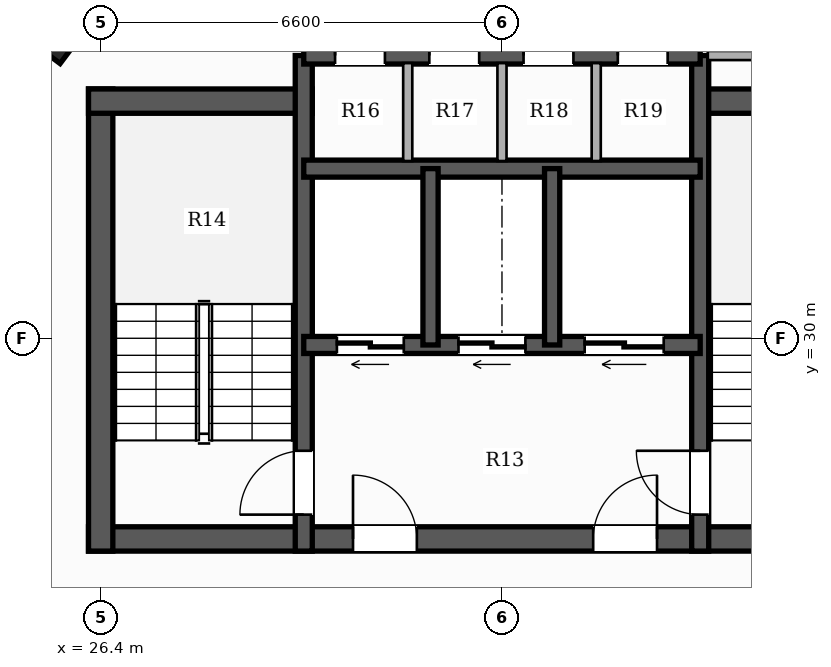
"""IFC4 building model, lengths in metres.
Left out: names, types, materials, properties, quantities, classifications, styles, units other than length and angle.
Written with IfcOpenShell. Run it as: python <this file> out.ifc"""

import sys

from ifc_helpers import new_model, si_unit, direction, frame, frame_2d, origin, origin_2d, place, context, subcontext, project, spatial, rectangle, hollow_rectangle, extrude, element, fill, save


model = new_model("IFC4")
c1 = context("Model", 3, precision=1e-05, world=origin(), true_north=direction((0.0, 1.0)))
c2 = subcontext(c1, "Body", "Model", "MODEL_VIEW")
j1 = project(units=[si_unit("LENGTHUNIT", "METRE"), si_unit("PLANEANGLEUNIT", "RADIAN")], contexts=[c1])
p1 = place(None, origin())
s1 = spatial("IfcSite", under=j1, at=p1, CompositionType="ELEMENT")
p2 = place(p1, origin())
s2 = spatial("IfcBuilding", under=s1, at=p2, CompositionType="ELEMENT")
p3 = place(p2, frame((0.0, 0.0, 129.8)))
s3 = spatial("IfcBuildingStorey", under=s2, at=p3, CompositionType="ELEMENT", Elevation=129.8)
p4 = place(p3, frame((26.2, 26.7, 0.0), z_axis=(0.0, 0.0, 1.0), x_axis=(1.0, 0.0, 0.0)))
e1 = element("IfcWall", 1, at=p4, inside=s3, PredefinedType="SHEAR", context=c2, shape_type="SweptSolid", body=[
    extrude(rectangle(XDim=13.6, YDim=0.4, at=frame_2d((6.8, 0.0))), origin(), (0.0, 0.0, 1.0), 3.3),
])
p5 = place(p4, frame((4.35, 0.0, 0.0)))
e2 = element("IfcOpeningElement", 2, at=p5, cuts=e1, PredefinedType="OPENING", context=c2, shape_type="SweptSolid", body=[
    extrude(rectangle(XDim=1.05, YDim=2.15, at=frame_2d((0.525, 1.075))), frame((0.0, 0.21, 0.0), z_axis=(0.0, -1.0, 0.0), x_axis=(1.0, 0.0, 0.0)), (0.0, 0.0, 1.0), 0.42),
])
p6 = place(p4, frame((8.3, 0.0, 0.0)))
e3 = element("IfcOpeningElement", 3, at=p6, cuts=e1, PredefinedType="OPENING", context=c2, shape_type="SweptSolid", body=[
    extrude(rectangle(XDim=1.05, YDim=2.15, at=frame_2d((0.525, 1.075))), frame((0.0, 0.21, 0.0), z_axis=(0.0, -1.0, 0.0), x_axis=(1.0, 0.0, 0.0)), (0.0, 0.0, 1.0), 0.42),
])
p7 = place(p3, frame((26.4, 26.5, 0.0), z_axis=(0.0, 0.0, 1.0), x_axis=(0.0, 1.0, 0.0)))
e4 = element("IfcWall", 4, at=p7, inside=s3, PredefinedType="SHEAR", context=c2, shape_type="SweptSolid", body=[
    extrude(rectangle(XDim=7.6, YDim=0.4, at=frame_2d((3.8, 0.0))), origin(), (0.0, 0.0, 1.0), 3.3),
])
for number, where, z_axis, x_axis in (
    (5, (26.2, 33.9, 0.0), (0.0, 0.0, 1.0), (1.0, 0.0, 0.0)),
    (6, (36.12, 33.9, 0.0), (0.0, 0.0, 1.0), (1.0, 0.0, 0.0)),
):
    element("IfcWall", number, at=place(p3, frame(where, z_axis=z_axis, x_axis=x_axis)), inside=s3, PredefinedType="SHEAR", context=c2, shape_type="SweptSolid", body=[
        extrude(rectangle(XDim=3.68, YDim=0.4, at=frame_2d((1.84, 0.0))), origin(), (0.0, 0.0, 1.0), 3.3),
    ])
p8 = place(p3, frame((29.74, 26.5, 0.0), z_axis=(0.0, 0.0, 1.0), x_axis=(0.0, 1.0, 0.0)))
e7 = element("IfcWall", 7, at=p8, inside=s3, PredefinedType="SHEAR", context=c2, shape_type="SweptSolid", body=[
    extrude(rectangle(XDim=8.15, YDim=0.28, at=frame_2d((4.075, 0.0))), origin(), (0.0, 0.0, 1.0), 3.3),
])
p9 = place(p8, frame((0.6, 0.0, 0.0)))
e8 = element("IfcOpeningElement", 8, at=p9, cuts=e7, PredefinedType="OPENING", context=c2, shape_type="SweptSolid", body=[
    extrude(rectangle(XDim=1.05, YDim=2.15, at=frame_2d((0.525, 1.075))), frame((0.0, 0.15, 0.0), z_axis=(0.0, -1.0, 0.0), x_axis=(1.0, 0.0, 0.0)), (0.0, 0.0, 1.0), 0.3),
])
p10 = place(p3, frame((36.26, 26.5, 0.0), z_axis=(0.0, 0.0, 1.0), x_axis=(0.0, 1.0, 0.0)))
e9 = element("IfcWall", 9, at=p10, inside=s3, PredefinedType="SHEAR", context=c2, shape_type="SweptSolid", body=[
    extrude(rectangle(XDim=8.15, YDim=0.28, at=frame_2d((4.075, 0.0))), origin(), (0.0, 0.0, 1.0), 3.3),
])
p11 = place(p10, frame((0.6, 0.0, 0.0)))
e10 = element("IfcOpeningElement", 10, at=p11, cuts=e9, PredefinedType="OPENING", context=c2, shape_type="SweptSolid", body=[
    extrude(rectangle(XDim=1.05, YDim=2.15, at=frame_2d((0.525, 1.075))), frame((0.0, 0.15, 0.0), z_axis=(0.0, -1.0, 0.0), x_axis=(1.0, 0.0, 0.0)), (0.0, 0.0, 1.0), 0.3),
])
p12 = place(p3, frame((36.26, 29.89, 0.0), z_axis=(0.0, 0.0, 1.0), x_axis=(-1.0, 0.0, 0.0)))
e11 = element("IfcWall", 11, at=p12, inside=s3, PredefinedType="SHEAR", context=c2, shape_type="SweptSolid", body=[
    extrude(rectangle(XDim=6.52, YDim=0.28, at=frame_2d((3.26, 0.0))), origin(), (0.0, 0.0, 1.0), 3.3),
])
p13 = place(p12, frame((4.875, 0.0, 0.0)))
e12 = element("IfcOpeningElement", 12, at=p13, cuts=e11, PredefinedType="OPENING", context=c2, shape_type="SweptSolid", body=[
    extrude(rectangle(XDim=1.1, YDim=2.2, at=frame_2d((0.55, 1.1))), frame((0.0, 0.15, 0.0), z_axis=(0.0, -1.0, 0.0), x_axis=(1.0, 0.0, 0.0)), (0.0, 0.0, 1.0), 0.3),
])
p14 = place(p12, frame((2.875, 0.0, 0.0)))
e13 = element("IfcOpeningElement", 13, at=p14, cuts=e11, PredefinedType="OPENING", context=c2, shape_type="SweptSolid", body=[
    extrude(rectangle(XDim=1.1, YDim=2.2, at=frame_2d((0.55, 1.1))), frame((0.0, 0.15, 0.0), z_axis=(0.0, -1.0, 0.0), x_axis=(1.0, 0.0, 0.0)), (0.0, 0.0, 1.0), 0.3),
])
p15 = place(p12, frame((0.6, 0.0, 0.0)))
e14 = element("IfcOpeningElement", 14, at=p15, cuts=e11, PredefinedType="OPENING", context=c2, shape_type="SweptSolid", body=[
    extrude(rectangle(XDim=1.3, YDim=2.2, at=frame_2d((0.65, 1.1))), frame((0.0, 0.15, 0.0), z_axis=(0.0, -1.0, 0.0), x_axis=(1.0, 0.0, 0.0)), (0.0, 0.0, 1.0), 0.3),
])
p16 = place(p3, frame((29.74, 32.79, 0.0), z_axis=(0.0, 0.0, 1.0), x_axis=(1.0, 0.0, 0.0)))
e15 = element("IfcWall", 15, at=p16, inside=s3, PredefinedType="SHEAR", context=c2, shape_type="SweptSolid", body=[
    extrude(rectangle(XDim=6.52, YDim=0.28, at=frame_2d((3.26, 0.0))), origin(), (0.0, 0.0, 1.0), 3.3),
])
for number, where, z_axis, x_axis in (
    (16, (31.825, 29.89, 0.0), (0.0, 0.0, 1.0), (0.0, 1.0, 0.0)),
    (17, (33.825, 29.89, 0.0), (0.0, 0.0, 1.0), (0.0, 1.0, 0.0)),
):
    element("IfcWall", number, at=place(p3, frame(where, z_axis=z_axis, x_axis=x_axis)), inside=s3, PredefinedType="SHEAR", context=c2, shape_type="SweptSolid", body=[
        extrude(rectangle(XDim=2.9, YDim=0.25, at=frame_2d((1.45, 0.0))), origin(), (0.0, 0.0, 1.0), 3.3),
    ])
p17 = place(p3, frame((29.74, 34.65, 0.0), z_axis=(0.0, 0.0, 1.0), x_axis=(1.0, 0.0, 0.0)))
e18 = element("IfcWall", 18, at=p17, inside=s3, PredefinedType="SHEAR", context=c2, shape_type="SweptSolid", body=[
    extrude(rectangle(XDim=6.52, YDim=0.28, at=frame_2d((3.26, 0.0))), origin(), (0.0, 0.0, 1.0), 3.3),
])
p18 = place(p17, frame((0.515, 0.0, 0.0)))
e19 = element("IfcOpeningElement", 19, at=p18, cuts=e18, PredefinedType="OPENING", context=c2, shape_type="SweptSolid", body=[
    extrude(rectangle(XDim=0.82, YDim=2.1, at=frame_2d((0.41, 1.05))), frame((0.0, 0.15, 0.0), z_axis=(0.0, -1.0, 0.0), x_axis=(1.0, 0.0, 0.0)), (0.0, 0.0, 1.0), 0.3),
])
p19 = place(p17, frame((2.065, 0.0, 0.0)))
e20 = element("IfcOpeningElement", 20, at=p19, cuts=e18, PredefinedType="OPENING", context=c2, shape_type="SweptSolid", body=[
    extrude(rectangle(XDim=0.82, YDim=2.1, at=frame_2d((0.41, 1.05))), frame((0.0, 0.15, 0.0), z_axis=(0.0, -1.0, 0.0), x_axis=(1.0, 0.0, 0.0)), (0.0, 0.0, 1.0), 0.3),
])
p20 = place(p17, frame((3.615, 0.0, 0.0)))
e21 = element("IfcOpeningElement", 21, at=p20, cuts=e18, PredefinedType="OPENING", context=c2, shape_type="SweptSolid", body=[
    extrude(rectangle(XDim=0.82, YDim=2.1, at=frame_2d((0.41, 1.05))), frame((0.0, 0.15, 0.0), z_axis=(0.0, -1.0, 0.0), x_axis=(1.0, 0.0, 0.0)), (0.0, 0.0, 1.0), 0.3),
])
p21 = place(p17, frame((5.165, 0.0, 0.0)))
e22 = element("IfcOpeningElement", 22, at=p21, cuts=e18, PredefinedType="OPENING", context=c2, shape_type="SweptSolid", body=[
    extrude(rectangle(XDim=0.82, YDim=2.1, at=frame_2d((0.41, 1.05))), frame((0.0, 0.15, 0.0), z_axis=(0.0, -1.0, 0.0), x_axis=(1.0, 0.0, 0.0)), (0.0, 0.0, 1.0), 0.3),
])
p22 = place(p3, frame((25.648, 35.113, 0.0), z_axis=(0.0, 0.0, 1.0), x_axis=(0.600420225326, 0.799684658487, 0.0)))
e23 = element("IfcColumn", 23, at=p22, inside=s3, PredefinedType="COLUMN", context=c2, shape_type="SweptSolid", body=[
    extrude(hollow_rectangle(XDim=0.85, YDim=0.85, WallThickness=0.028, at=origin_2d()), origin(), (0.0, 0.0, 1.0), 3.3),
])
p23 = place(p3, frame((36.385, 34.65, 0.0), z_axis=(0.0, 0.0, 1.0), x_axis=(1.0, 0.0, 0.0)))
e24 = element("IfcWall", 24, at=p23, inside=s3, PredefinedType="PARTITIONING", context=c2, shape_type="SweptSolid", body=[
    extrude(rectangle(XDim=1.405, YDim=0.15, at=frame_2d((0.703, 0.0))), origin(), (0.0, 0.0, 1.0), 2.425),
])
for number, where, z_axis, x_axis in (
    (25, (31.45, 32.915, 0.0), (0.0, 0.0, 1.0), (0.0, 1.0, 0.0)),
    (26, (33.0, 32.915, 0.0), (0.0, 0.0, 1.0), (0.0, 1.0, 0.0)),
    (27, (34.55, 32.915, 0.0), (0.0, 0.0, 1.0), (0.0, 1.0, 0.0)),
):
    element("IfcWall", number, at=place(p3, frame(where, z_axis=z_axis, x_axis=x_axis)), inside=s3, PredefinedType="PARTITIONING", context=c2, shape_type="SweptSolid", body=[
        extrude(rectangle(XDim=1.61, YDim=0.15, at=frame_2d((0.805, 0.0))), origin(), (0.0, 0.0, 1.0), 3.06),
    ])
p24 = place(p9, origin())
e28 = element("IfcDoor", 28, at=p24, inside=s3, OperationType="SINGLE_SWING_LEFT", PredefinedType="DOOR", context=c2, shape_type="SweptSolid", body=[
    extrude(rectangle(XDim=1.05, YDim=2.15, at=frame_2d((0.525, 1.075))), frame((0.0, 0.025, 0.0), z_axis=(0.0, -1.0, 0.0), x_axis=(1.0, 0.0, 0.0)), (0.0, 0.0, 1.0), 0.05),
])
fill(e8, e28)
p25 = place(p11, origin())
e29 = element("IfcDoor", 29, at=p25, inside=s3, OperationType="SINGLE_SWING_RIGHT", PredefinedType="DOOR", context=c2, shape_type="SweptSolid", body=[
    extrude(rectangle(XDim=1.05, YDim=2.15, at=frame_2d((0.525, 1.075))), frame((0.0, 0.025, 0.0), z_axis=(0.0, -1.0, 0.0), x_axis=(1.0, 0.0, 0.0)), (0.0, 0.0, 1.0), 0.05),
])
fill(e10, e29)
p26 = place(p5, origin())
e30 = element("IfcDoor", 30, at=p26, inside=s3, OperationType="SINGLE_SWING_LEFT", PredefinedType="DOOR", context=c2, shape_type="SweptSolid", body=[
    extrude(rectangle(XDim=1.05, YDim=2.15, at=frame_2d((0.525, 1.075))), frame((0.0, 0.025, 0.0), z_axis=(0.0, -1.0, 0.0), x_axis=(1.0, 0.0, 0.0)), (0.0, 0.0, 1.0), 0.05),
])
fill(e2, e30)
p27 = place(p6, origin())
e31 = element("IfcDoor", 31, at=p27, inside=s3, OperationType="SINGLE_SWING_RIGHT", PredefinedType="DOOR", context=c2, shape_type="SweptSolid", body=[
    extrude(rectangle(XDim=1.05, YDim=2.15, at=frame_2d((0.525, 1.075))), frame((0.0, 0.025, 0.0), z_axis=(0.0, -1.0, 0.0), x_axis=(1.0, 0.0, 0.0)), (0.0, 0.0, 1.0), 0.05),
])
fill(e3, e31)
p28 = place(p13, origin())
e32 = element("IfcDoor", 32, at=p28, inside=s3, OperationType="DOUBLE_DOOR_SLIDING", PredefinedType="DOOR", context=c2, shape_type="SweptSolid", body=[
    extrude(rectangle(XDim=1.1, YDim=2.2, at=frame_2d((0.55, 1.1))), frame((0.0, 0.025, 0.0), z_axis=(0.0, -1.0, 0.0), x_axis=(1.0, 0.0, 0.0)), (0.0, 0.0, 1.0), 0.05),
])
fill(e12, e32)
p29 = place(p14, origin())
e33 = element("IfcDoor", 33, at=p29, inside=s3, OperationType="DOUBLE_DOOR_SLIDING", PredefinedType="DOOR", context=c2, shape_type="SweptSolid", body=[
    extrude(rectangle(XDim=1.1, YDim=2.2, at=frame_2d((0.55, 1.1))), frame((0.0, 0.025, 0.0), z_axis=(0.0, -1.0, 0.0), x_axis=(1.0, 0.0, 0.0)), (0.0, 0.0, 1.0), 0.05),
])
fill(e13, e33)
p30 = place(p15, origin())
e34 = element("IfcDoor", 34, at=p30, inside=s3, OperationType="DOUBLE_DOOR_SLIDING", PredefinedType="DOOR", context=c2, shape_type="SweptSolid", body=[
    extrude(rectangle(XDim=1.3, YDim=2.2, at=frame_2d((0.65, 1.1))), frame((0.0, 0.025, 0.0), z_axis=(0.0, -1.0, 0.0), x_axis=(1.0, 0.0, 0.0)), (0.0, 0.0, 1.0), 0.05),
])
fill(e14, e34)
p31 = place(p18, origin())
e35 = element("IfcDoor", 35, at=p31, inside=s3, OperationType="SINGLE_SWING_LEFT", PredefinedType="DOOR", context=c2, shape_type="SweptSolid", body=[
    extrude(rectangle(XDim=0.82, YDim=2.1, at=frame_2d((0.41, 1.05))), frame((0.0, 0.025, 0.0), z_axis=(0.0, -1.0, 0.0), x_axis=(1.0, 0.0, 0.0)), (0.0, 0.0, 1.0), 0.05),
])
fill(e19, e35)
p32 = place(p19, origin())
e36 = element("IfcDoor", 36, at=p32, inside=s3, OperationType="SINGLE_SWING_LEFT", PredefinedType="DOOR", context=c2, shape_type="SweptSolid", body=[
    extrude(rectangle(XDim=0.82, YDim=2.1, at=frame_2d((0.41, 1.05))), frame((0.0, 0.025, 0.0), z_axis=(0.0, -1.0, 0.0), x_axis=(1.0, 0.0, 0.0)), (0.0, 0.0, 1.0), 0.05),
])
fill(e20, e36)
p33 = place(p20, origin())
e37 = element("IfcDoor", 37, at=p33, inside=s3, OperationType="SINGLE_SWING_LEFT", PredefinedType="DOOR", context=c2, shape_type="SweptSolid", body=[
    extrude(rectangle(XDim=0.82, YDim=2.1, at=frame_2d((0.41, 1.05))), frame((0.0, 0.025, 0.0), z_axis=(0.0, -1.0, 0.0), x_axis=(1.0, 0.0, 0.0)), (0.0, 0.0, 1.0), 0.05),
])
fill(e21, e37)
p34 = place(p21, origin())
e38 = element("IfcDoor", 38, at=p34, inside=s3, OperationType="SINGLE_SWING_LEFT", PredefinedType="DOOR", context=c2, shape_type="SweptSolid", body=[
    extrude(rectangle(XDim=0.82, YDim=2.1, at=frame_2d((0.41, 1.05))), frame((0.0, 0.025, 0.0), z_axis=(0.0, -1.0, 0.0), x_axis=(1.0, 0.0, 0.0)), (0.0, 0.0, 1.0), 0.05),
])
fill(e22, e38)
save(model, sys.argv[1])
